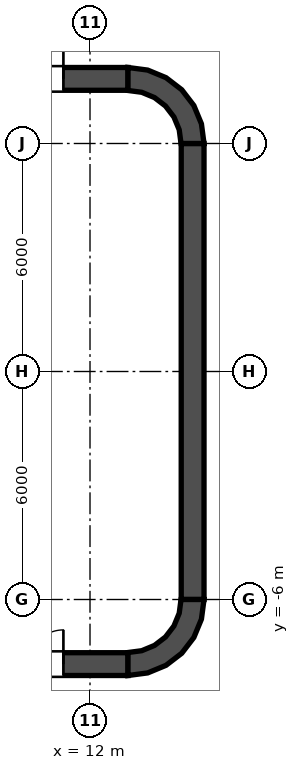
"""IFC4 building model, lengths in metres.
Left out: names, types, materials, properties, quantities, classifications, styles, units other than length and angle.
Written with IfcOpenShell. Run it as: python <this file> out.ifc"""

import sys

from ifc_helpers import new_model, si_unit, direction, frame, frame_2d, origin, place, context, subcontext, project, spatial, polyline, rectangle, outline, extrude, element, fill, save


model = new_model("IFC4")
c1 = context("Model", 3, precision=1e-05, world=origin(), true_north=direction((0.0, 1.0)))
c2 = subcontext(c1, "Body", "Model", "MODEL_VIEW")
j1 = project(units=[si_unit("LENGTHUNIT", "METRE"), si_unit("PLANEANGLEUNIT", "RADIAN")], contexts=[c1])
p1 = place(None, origin())
s1 = spatial("IfcSite", under=j1, at=p1, CompositionType="ELEMENT")
p2 = place(p1, origin())
s2 = spatial("IfcBuilding", under=s1, at=p2, CompositionType="ELEMENT")
p3 = place(p2, frame((0.0, 0.0, 26.0)))
s3 = spatial("IfcBuildingStorey", under=s2, at=p3, CompositionType="ELEMENT", Elevation=26.0)
p4 = place(p3, frame((-13.0, 7.7, 0.0), z_axis=(0.0, 0.0, 1.0), x_axis=(1.0, 0.0, 0.0)))
e1 = element("IfcWall", 1, at=p4, inside=s3, PredefinedType="SHEAR", context=c2, shape_type="SweptSolid", body=[
    extrude(rectangle(XDim=26.0, YDim=0.6, at=frame_2d((13.0, 0.0))), origin(), (0.0, 0.0, 1.0), 5.4),
])
p5 = place(p4, frame((1.7, 0.0, 0.0)))
e2 = element("IfcOpeningElement", 2, at=p5, cuts=e1, PredefinedType="OPENING", context=c2, shape_type="SweptSolid", body=[
    extrude(rectangle(XDim=1.8, YDim=2.1, at=frame_2d((0.9, 1.05))), frame((0.0, 0.3, 0.0), z_axis=(0.0, -1.0, 0.0), x_axis=(1.0, 0.0, 0.0)), (0.0, 0.0, 1.0), 0.6),
])
p6 = place(p4, frame((22.5, 0.0, 0.0)))
e3 = element("IfcOpeningElement", 3, at=p6, cuts=e1, PredefinedType="OPENING", context=c2, shape_type="SweptSolid", body=[
    extrude(rectangle(XDim=1.8, YDim=2.1, at=frame_2d((0.9, 1.05))), frame((0.0, 0.3, 0.0), z_axis=(0.0, -1.0, 0.0), x_axis=(1.0, 0.0, 0.0)), (0.0, 0.0, 1.0), 0.6),
])
p7 = place(p3, frame((-13.0, -7.7, 0.0), z_axis=(0.0, 0.0, 1.0), x_axis=(1.0, 0.0, 0.0)))
e4 = element("IfcWall", 4, at=p7, inside=s3, PredefinedType="SHEAR", context=c2, shape_type="SweptSolid", body=[
    extrude(rectangle(XDim=26.0, YDim=0.6, at=frame_2d((13.0, 0.0))), origin(), (0.0, 0.0, 1.0), 5.4),
])
p8 = place(p7, frame((1.7, 0.0, 0.0)))
e5 = element("IfcOpeningElement", 5, at=p8, cuts=e4, PredefinedType="OPENING", context=c2, shape_type="SweptSolid", body=[
    extrude(rectangle(XDim=1.8, YDim=2.1, at=frame_2d((0.9, 1.05))), frame((0.0, 0.3, 0.0), z_axis=(0.0, -1.0, 0.0), x_axis=(1.0, 0.0, 0.0)), (0.0, 0.0, 1.0), 0.6),
])
p9 = place(p7, frame((22.5, 0.0, 0.0)))
e6 = element("IfcOpeningElement", 6, at=p9, cuts=e4, PredefinedType="OPENING", context=c2, shape_type="SweptSolid", body=[
    extrude(rectangle(XDim=1.8, YDim=2.1, at=frame_2d((0.9, 1.05))), frame((0.0, 0.3, 0.0), z_axis=(0.0, -1.0, 0.0), x_axis=(1.0, 0.0, 0.0)), (0.0, 0.0, 1.0), 0.6),
])
p10 = place(p3, frame((14.7, -6.0, 0.0), z_axis=(0.0, 0.0, 1.0), x_axis=(0.0, 1.0, 0.0)))
e7 = element("IfcWall", 7, at=p10, inside=s3, PredefinedType="SHEAR", context=c2, shape_type="SweptSolid", body=[
    extrude(rectangle(XDim=12.0, YDim=0.6, at=frame_2d((6.0, 0.0))), origin(), (0.0, 0.0, 1.0), 5.4),
])
p11 = place(p3, origin())
e8 = element("IfcWall", 8, at=p11, inside=s3, PredefinedType="SHEAR", context=c2, shape_type="SweptSolid", body=[
    extrude(outline(polyline([(13.0, 8.0), (13.0, 7.395), (13.361, 7.347), (13.698, 7.208), (13.986, 6.986), (14.208, 6.698), (14.347, 6.361), (14.395, 6.0), (15.0, 6.0), (14.932, 6.518), (14.732, 7.0), (14.414, 7.414), (14.0, 7.732), (13.518, 7.932), (13.0, 8.0)])), origin(), (0.0, 0.0, 1.0), 5.4),
])
e9 = element("IfcWall", 9, at=p11, inside=s3, PredefinedType="SHEAR", context=c2, shape_type="SweptSolid", body=[
    extrude(outline(polyline([(15.0, -6.0), (14.395, -6.0), (14.347, -6.361), (14.208, -6.698), (13.986, -6.986), (13.698, -7.208), (13.361, -7.347), (13.0, -7.395), (13.0, -8.0), (13.518, -7.932), (14.0, -7.732), (14.414, -7.414), (14.732, -7.0), (14.932, -6.518), (15.0, -6.0)])), origin(), (0.0, 0.0, 1.0), 5.4),
])
p12 = place(p3, frame((11.8, -7.4, 0.0), z_axis=(0.0, 0.0, 1.0), x_axis=(0.0, 1.0, 0.0)))
e10 = element("IfcWall", 10, at=p12, inside=s3, PredefinedType="SOLIDWALL", context=c2, shape_type="SweptSolid", body=[
    extrude(rectangle(XDim=14.8, YDim=0.4, at=frame_2d((7.4, 0.0))), origin(), (0.0, 0.0, 1.0), 5.2),
])
p13 = place(p12, frame((11.2, 0.0, 0.0)))
e11 = element("IfcOpeningElement", 11, at=p13, cuts=e10, PredefinedType="OPENING", context=c2, shape_type="SweptSolid", body=[
    extrude(rectangle(XDim=1.1, YDim=2.1, at=frame_2d((0.55, 1.05))), frame((0.0, 0.2, 0.0), z_axis=(0.0, -1.0, 0.0), x_axis=(1.0, 0.0, 0.0)), (0.0, 0.0, 1.0), 0.4),
])
p14 = place(p12, frame((8.3, 0.0, 0.0)))
e12 = element("IfcOpeningElement", 12, at=p14, cuts=e10, PredefinedType="OPENING", context=c2, shape_type="SweptSolid", body=[
    extrude(rectangle(XDim=1.1, YDim=2.1, at=frame_2d((0.55, 1.05))), frame((0.0, 0.2, 0.0), z_axis=(0.0, -1.0, 0.0), x_axis=(1.0, 0.0, 0.0)), (0.0, 0.0, 1.0), 0.4),
])
p15 = place(p12, frame((5.4, 0.0, 0.0)))
e13 = element("IfcOpeningElement", 13, at=p15, cuts=e10, PredefinedType="OPENING", context=c2, shape_type="SweptSolid", body=[
    extrude(rectangle(XDim=1.1, YDim=2.1, at=frame_2d((0.55, 1.05))), frame((0.0, 0.2, 0.0), z_axis=(0.0, -1.0, 0.0), x_axis=(1.0, 0.0, 0.0)), (0.0, 0.0, 1.0), 0.4),
])
p16 = place(p12, frame((13.552, 0.0, 0.0)))
e14 = element("IfcOpeningElement", 14, at=p16, cuts=e10, PredefinedType="OPENING", context=c2, shape_type="SweptSolid", body=[
    extrude(rectangle(XDim=0.9, YDim=2.1, at=frame_2d((0.45, 1.05))), frame((0.0, 0.2, 0.0), z_axis=(0.0, -1.0, 0.0), x_axis=(1.0, 0.0, 0.0)), (0.0, 0.0, 1.0), 0.4),
])
p17 = place(p12, frame((0.347, 0.0, 0.0)))
e15 = element("IfcOpeningElement", 15, at=p17, cuts=e10, PredefinedType="OPENING", context=c2, shape_type="SweptSolid", body=[
    extrude(rectangle(XDim=0.9, YDim=2.1, at=frame_2d((0.45, 1.05))), frame((0.0, 0.2, 0.0), z_axis=(0.0, -1.0, 0.0), x_axis=(1.0, 0.0, 0.0)), (0.0, 0.0, 1.0), 0.4),
])
e16 = element("IfcWall", 16, at=p11, inside=s3, PredefinedType="SOLIDWALL", context=c2, shape_type="SweptSolid", body=[
    extrude(outline(polyline([(12.0, -5.675), (12.0, -5.925), (14.15, -5.925), (14.4, -5.925), (14.4, -5.675), (14.4, -3.025), (14.4, -2.775), (14.4, -0.125), (14.4, 0.125), (14.4, 2.775), (14.4, 3.025), (14.4, 5.675), (14.4, 5.925), (14.15, 5.925), (12.0, 5.925), (12.0, 5.675), (14.15, 5.675), (14.15, 3.025), (12.0, 3.025), (12.0, 2.775), (14.15, 2.775), (14.15, 0.125), (12.0, 0.125), (12.0, -0.125), (14.15, -0.125), (14.15, -2.775), (12.0, -2.775), (12.0, -3.025), (14.15, -3.025), (14.15, -5.675), (12.0, -5.675)])), origin(), (0.0, 0.0, 1.0), 5.2),
])
p18 = place(p13, origin())
e17 = element("IfcDoor", 17, at=p18, inside=s3, OperationType="DOUBLE_DOOR_SLIDING", PredefinedType="DOOR", context=c2, shape_type="SweptSolid", body=[
    extrude(rectangle(XDim=1.1, YDim=2.1, at=frame_2d((0.55, 1.05))), frame((0.0, 0.025, 0.0), z_axis=(0.0, -1.0, 0.0), x_axis=(1.0, 0.0, 0.0)), (0.0, 0.0, 1.0), 0.05),
])
fill(e11, e17)
p19 = place(p14, origin())
e18 = element("IfcDoor", 18, at=p19, inside=s3, OperationType="DOUBLE_DOOR_SLIDING", PredefinedType="DOOR", context=c2, shape_type="SweptSolid", body=[
    extrude(rectangle(XDim=1.1, YDim=2.1, at=frame_2d((0.55, 1.05))), frame((0.0, 0.025, 0.0), z_axis=(0.0, -1.0, 0.0), x_axis=(1.0, 0.0, 0.0)), (0.0, 0.0, 1.0), 0.05),
])
fill(e12, e18)
p20 = place(p15, origin())
e19 = element("IfcDoor", 19, at=p20, inside=s3, OperationType="DOUBLE_DOOR_SLIDING", PredefinedType="DOOR", context=c2, shape_type="SweptSolid", body=[
    extrude(rectangle(XDim=1.1, YDim=2.1, at=frame_2d((0.55, 1.05))), frame((0.0, 0.025, 0.0), z_axis=(0.0, -1.0, 0.0), x_axis=(1.0, 0.0, 0.0)), (0.0, 0.0, 1.0), 0.05),
])
fill(e13, e19)
p21 = place(p16, origin())
e20 = element("IfcDoor", 20, at=p21, inside=s3, OperationType="SINGLE_SWING_RIGHT", PredefinedType="DOOR", context=c2, shape_type="SweptSolid", body=[
    extrude(rectangle(XDim=0.9, YDim=2.1, at=frame_2d((0.45, 1.05))), frame((0.0, 0.025, 0.0), z_axis=(0.0, -1.0, 0.0), x_axis=(1.0, 0.0, 0.0)), (0.0, 0.0, 1.0), 0.05),
])
fill(e14, e20)
p22 = place(p17, origin())
e21 = element("IfcDoor", 21, at=p22, inside=s3, OperationType="SINGLE_SWING_RIGHT", PredefinedType="DOOR", context=c2, shape_type="SweptSolid", body=[
    extrude(rectangle(XDim=0.9, YDim=2.1, at=frame_2d((0.45, 1.05))), frame((0.0, 0.025, 0.0), z_axis=(0.0, -1.0, 0.0), x_axis=(1.0, 0.0, 0.0)), (0.0, 0.0, 1.0), 0.05),
])
fill(e15, e21)
p23 = place(p6, origin())
e22 = element("IfcDoor", 22, at=p23, inside=s3, OperationType="DOUBLE_DOOR_SINGLE_SWING", PredefinedType="DOOR", context=c2, shape_type="SweptSolid", body=[
    extrude(rectangle(XDim=1.8, YDim=2.1, at=frame_2d((0.9, 1.05))), frame((0.0, 0.025, 0.0), z_axis=(0.0, -1.0, 0.0), x_axis=(1.0, 0.0, 0.0)), (0.0, 0.0, 1.0), 0.05),
])
fill(e3, e22)
p24 = place(p9, origin())
e23 = element("IfcDoor", 23, at=p24, inside=s3, OperationType="DOUBLE_DOOR_SINGLE_SWING", PredefinedType="DOOR", context=c2, shape_type="SweptSolid", body=[
    extrude(rectangle(XDim=1.8, YDim=2.1, at=frame_2d((0.9, 1.05))), frame((0.0, 0.025, 0.0), z_axis=(0.0, -1.0, 0.0), x_axis=(1.0, 0.0, 0.0)), (0.0, 0.0, 1.0), 0.05),
])
fill(e6, e23)
save(model, sys.argv[1])
